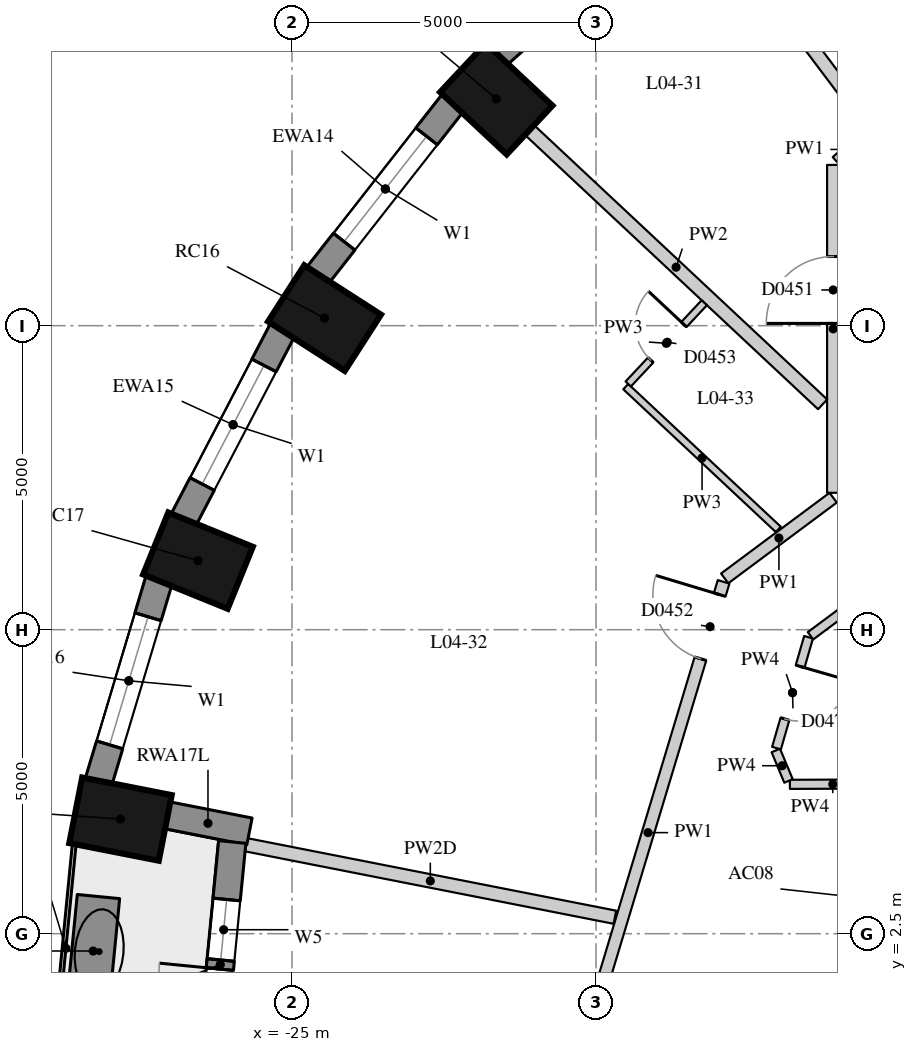
"""IFC4 building model, lengths in metres.
Left out: names, types, materials, properties, quantities, classifications, styles, units other than length and angle.
Written with IfcOpenShell. Run it as: python <this file> out.ifc"""

import sys

from ifc_helpers import new_model, si_unit, direction, frame, frame_2d, origin, origin_2d, place, context, subcontext, project, spatial, rectangle, extrude, element, fill, save


model = new_model("IFC4")
c1 = context("Model", 3, precision=1e-05, world=origin(), true_north=direction((0.0, 1.0)))
c2 = subcontext(c1, "Body", "Model", "MODEL_VIEW")
j1 = project(units=[si_unit("LENGTHUNIT", "METRE"), si_unit("PLANEANGLEUNIT", "RADIAN")], contexts=[c1])
p1 = place(None, origin())
s1 = spatial("IfcSite", under=j1, at=p1, CompositionType="ELEMENT")
p2 = place(p1, origin())
s2 = spatial("IfcBuilding", under=s1, at=p2, CompositionType="ELEMENT")
p3 = place(p2, frame((0.0, 0.0, 21.7)))
s3 = spatial("IfcBuildingStorey", under=s2, at=p3, CompositionType="ELEMENT", Elevation=21.7)
for number, where, z_axis, x_axis in (
    (1, (-21.641, 16.23, 0.0), (0.0, 0.0, 1.0), (-0.73, 0.683, 0.0)),
    (2, (-24.465, 12.625, 0.0), (0.0, 0.0, 1.0), (-0.841, 0.541, 0.0)),
    (3, (-26.546, 8.636, 0.0), (0.0, 0.0, 1.0), (-0.927, 0.376, 0.0)),
    (4, (-27.821, 4.385, 0.0), (0.0, 0.0, 1.0), (-0.981, 0.193, 0.0)),
):
    element("IfcColumn", number, at=place(p3, frame(where, z_axis=z_axis, x_axis=x_axis)), inside=s3, PredefinedType="COLUMN", context=c2, shape_type="SweptSolid", body=[
        extrude(rectangle(XDim=1.5, YDim=1.1, at=origin_2d()), origin(), (0.0, 0.0, 1.0), 3.3),
    ])
p4 = place(p3, frame((-18.871, 19.407, 0.0), z_axis=(0.0, 0.0, 1.0), x_axis=(-0.745526233716, -0.66647628228, 0.0)))
e5 = element("IfcWall", 5, at=p4, inside=s3, PredefinedType="SOLIDWALL", context=c2, shape_type="SweptSolid", body=[
    extrude(rectangle(XDim=3.697, YDim=0.45, at=frame_2d((1.848, 0.0))), origin(), (0.0, 0.0, 1.0), 3.02),
])
p5 = place(p4, frame((0.749, 0.0, 0.4)))
e6 = element("IfcOpeningElement", 6, at=p5, cuts=e5, PredefinedType="OPENING", context=c2, shape_type="SweptSolid", body=[
    extrude(rectangle(XDim=2.2, YDim=1.75, at=frame_2d((1.1, 0.875))), frame((0.0, 0.235, 0.0), z_axis=(0.0, -1.0, 0.0), x_axis=(1.0, 0.0, 0.0)), (0.0, 0.0, 1.0), 0.47),
])
p6 = place(p3, frame((-22.352, 16.17, 0.0), z_axis=(0.0, 0.0, 1.0), x_axis=(-0.616661975264, -0.787228053529, 0.0)))
e7 = element("IfcWall", 7, at=p6, inside=s3, PredefinedType="SOLIDWALL", context=c2, shape_type="SweptSolid", body=[
    extrude(rectangle(XDim=3.61, YDim=0.45, at=frame_2d((1.805, 0.0))), origin(), (0.0, 0.0, 1.0), 3.02),
])
p7 = place(p6, frame((0.705, 0.0, 0.4)))
e8 = element("IfcOpeningElement", 8, at=p7, cuts=e7, PredefinedType="OPENING", context=c2, shape_type="SweptSolid", body=[
    extrude(rectangle(XDim=2.2, YDim=1.75, at=frame_2d((1.1, 0.875))), frame((0.0, 0.235, 0.0), z_axis=(0.0, -1.0, 0.0), x_axis=(1.0, 0.0, 0.0)), (0.0, 0.0, 1.0), 0.47),
])
p8 = place(p3, frame((-25.152, 12.437, 0.0), z_axis=(0.0, 0.0, 1.0), x_axis=(-0.462492775226, -0.886623050041, 0.0)))
e9 = element("IfcWall", 9, at=p8, inside=s3, PredefinedType="SOLIDWALL", context=c2, shape_type="SweptSolid", body=[
    extrude(rectangle(XDim=3.532, YDim=0.45, at=frame_2d((1.766, 0.0))), origin(), (0.0, 0.0, 1.0), 3.02),
])
p9 = place(p8, frame((0.666, 0.0, 0.4)))
e10 = element("IfcOpeningElement", 10, at=p9, cuts=e9, PredefinedType="OPENING", context=c2, shape_type="SweptSolid", body=[
    extrude(rectangle(XDim=2.2, YDim=1.75, at=frame_2d((1.1, 0.875))), frame((0.0, 0.235, 0.0), z_axis=(0.0, -1.0, 0.0), x_axis=(1.0, 0.0, 0.0)), (0.0, 0.0, 1.0), 0.47),
])
p10 = place(p3, frame((-27.185, 8.323, 0.0), z_axis=(0.0, 0.0, 1.0), x_axis=(-0.287064133733, -0.957911364963, 0.0)))
e11 = element("IfcWall", 11, at=p10, inside=s3, PredefinedType="SOLIDWALL", context=c2, shape_type="SweptSolid", body=[
    extrude(rectangle(XDim=3.473, YDim=0.45, at=frame_2d((1.737, 0.0))), origin(), (0.0, 0.0, 1.0), 3.02),
])
p11 = place(p10, frame((0.637, 0.0, 0.4)))
e12 = element("IfcOpeningElement", 12, at=p11, cuts=e11, PredefinedType="OPENING", context=c2, shape_type="SweptSolid", body=[
    extrude(rectangle(XDim=2.2, YDim=1.75, at=frame_2d((1.1, 0.875))), frame((0.0, 0.235, 0.0), z_axis=(0.0, -1.0, 0.0), x_axis=(1.0, 0.0, 0.0)), (0.0, 0.0, 1.0), 0.47),
])
p12 = place(p3, frame((-27.064, 4.45, 0.0), z_axis=(0.0, 0.0, 1.0), x_axis=(0.98123042829, -0.192838913596, 0.0)))
e13 = element("IfcWall", 13, at=p12, inside=s3, PredefinedType="SOLIDWALL", context=c2, shape_type="SweptSolid", body=[
    extrude(rectangle(XDim=1.39, YDim=0.45, at=frame_2d((0.695, 0.0))), origin(), (0.0, 0.0, 1.0), 2.47),
])
p13 = place(p3, frame((-25.983, 4.008, 0.0), z_axis=(0.0, 0.0, 1.0), x_axis=(-0.097133468736, -0.995271364629, 0.0)))
e14 = element("IfcWall", 14, at=p13, inside=s3, PredefinedType="SOLIDWALL", context=c2, shape_type="SweptSolid", body=[
    extrude(rectangle(XDim=4.049, YDim=0.45, at=frame_2d((2.024, 0.0))), origin(), (0.0, 0.0, 1.0), 3.02),
])
p14 = place(p13, frame((0.949, 0.0, 0.4)))
e15 = element("IfcOpeningElement", 15, at=p14, cuts=e14, PredefinedType="OPENING", context=c2, shape_type="SweptSolid", body=[
    extrude(rectangle(XDim=1.0, YDim=1.75, at=frame_2d((0.5, 0.875))), frame((0.0, 0.235, 0.0), z_axis=(0.0, -1.0, 0.0), x_axis=(1.0, 0.0, 0.0)), (0.0, 0.0, 1.0), 0.47),
])
p15 = place(p13, frame((2.1, 0.0, 0.0)))
e16 = element("IfcOpeningElement", 16, at=p15, cuts=e14, PredefinedType="OPENING", context=c2, shape_type="SweptSolid", body=[
    extrude(rectangle(XDim=1.0, YDim=2.15, at=frame_2d((0.5, 1.075))), frame((0.0, 0.235, 0.0), z_axis=(0.0, -1.0, 0.0), x_axis=(1.0, 0.0, 0.0)), (0.0, 0.0, 1.0), 0.47),
])
p16 = place(p3, frame((-28.183, 3.111, 0.0), z_axis=(0.0, 0.0, 1.0), x_axis=(-0.097381768628, -0.995247100543, 0.0)))
e17 = element("IfcWall", 17, at=p16, inside=s3, PredefinedType="USERDEFINED", context=c2, shape_type="SweptSolid", body=[
    extrude(rectangle(XDim=1.8, YDim=0.7, at=frame_2d((0.9, 0.0))), origin(), (0.0, 0.0, 1.0), 0.75),
])
p17 = place(p3, frame((-17.884, 8.344, 0.0), z_axis=(0.0, 0.0, 1.0), x_axis=(0.802260120548, 0.596974621721, 0.0)))
e18 = element("IfcWall", 18, at=p17, inside=s3, PredefinedType="PARTITIONING", context=c2, shape_type="SweptSolid", body=[
    extrude(rectangle(XDim=2.224, YDim=0.2, at=frame_2d((1.112, 0.0))), origin(), (0.0, 0.0, 1.0), 3.02),
])
p18 = place(p3, frame((-16.1, 9.751, 0.0), z_axis=(0.0, 0.0, 1.0), x_axis=(0.0, 1.0, 0.0)))
e19 = element("IfcWall", 19, at=p18, inside=s3, PredefinedType="PARTITIONING", context=c2, shape_type="SweptSolid", body=[
    extrude(rectangle(XDim=5.393, YDim=0.2, at=frame_2d((2.696, 0.0))), origin(), (0.0, 0.0, 1.0), 3.02),
])
p19 = place(p18, frame((2.786, 0.0, 0.0)))
e20 = element("IfcOpeningElement", 20, at=p19, cuts=e19, PredefinedType="OPENING", context=c2, shape_type="SweptSolid", body=[
    extrude(rectangle(XDim=1.1, YDim=2.1, at=frame_2d((0.55, 1.05))), frame((0.0, 0.11, 0.0), z_axis=(0.0, -1.0, 0.0), x_axis=(1.0, 0.0, 0.0)), (0.0, 0.0, 1.0), 0.22),
])
p20 = place(p3, frame((-16.041, 15.198, 0.0), z_axis=(0.0, 0.0, 1.0), x_axis=(0.744722115519, 0.667374685359, 0.0)))
e21 = element("IfcWall", 21, at=p20, inside=s3, PredefinedType="PARTITIONING", context=c2, shape_type="SweptSolid", body=[
    extrude(rectangle(XDim=0.603, YDim=0.2, at=frame_2d((0.301, 0.0))), origin(), (0.0, 0.0, 1.0), 3.02),
])
p21 = place(p3, frame((-20.388, 0.038, 0.0), z_axis=(0.0, 0.0, 1.0), x_axis=(0.288600779805, 0.957449523419, 0.0)))
e22 = element("IfcWall", 22, at=p21, inside=s3, PredefinedType="PARTITIONING", context=c2, shape_type="SweptSolid", body=[
    extrude(rectangle(XDim=8.615, YDim=0.2, at=frame_2d((4.308, 0.0))), origin(), (0.0, 0.0, 1.0), 3.02),
])
p22 = place(p21, frame((7.295, 0.0, 0.0)))
e23 = element("IfcOpeningElement", 23, at=p22, cuts=e22, PredefinedType="OPENING", context=c2, shape_type="SweptSolid", body=[
    extrude(rectangle(XDim=1.1, YDim=2.1, at=frame_2d((0.55, 1.05))), frame((0.0, 0.11, 0.0), z_axis=(0.0, -1.0, 0.0), x_axis=(1.0, 0.0, 0.0)), (0.0, 0.0, 1.0), 0.22),
])
p23 = place(p21, frame((0.22, 0.0, 0.0)))
e24 = element("IfcOpeningElement", 24, at=p23, cuts=e22, PredefinedType="OPENING", context=c2, shape_type="SweptSolid", body=[
    extrude(rectangle(XDim=1.1, YDim=2.1, at=frame_2d((0.55, 1.05))), frame((0.0, 0.11, 0.0), z_axis=(0.0, -1.0, 0.0), x_axis=(1.0, 0.0, 0.0)), (0.0, 0.0, 1.0), 0.22),
])
p24 = place(p3, frame((-15.402, 4.961, 0.0), z_axis=(0.0, 0.0, 1.0), x_axis=(-0.999994001087, -0.003463782477, 0.0)))
e25 = element("IfcWall", 25, at=p24, inside=s3, PredefinedType="PARTITIONING", context=c2, shape_type="SweptSolid", body=[
    extrude(rectangle(XDim=1.41, YDim=0.15, at=frame_2d((0.705, 0.0))), origin(), (0.0, 0.0, 1.0), 3.02),
])
p25 = place(p3, frame((-16.834, 5.012, 0.0), z_axis=(0.0, 0.0, 1.0), x_axis=(-0.384455737739, 0.923143426408, 0.0)))
e26 = element("IfcWall", 26, at=p25, inside=s3, PredefinedType="PARTITIONING", context=c2, shape_type="SweptSolid", body=[
    extrude(rectangle(XDim=0.543, YDim=0.15, at=frame_2d((0.271, 0.0))), origin(), (0.0, 0.0, 1.0), 3.02),
])
p26 = place(p3, frame((-17.032, 5.552, 0.0), z_axis=(0.0, 0.0, 1.0), x_axis=(0.277658349549, 0.96067988473, 0.0)))
e27 = element("IfcWall", 27, at=p26, inside=s3, PredefinedType="PARTITIONING", context=c2, shape_type="SweptSolid", body=[
    extrude(rectangle(XDim=1.898, YDim=0.15, at=frame_2d((0.949, 0.0))), origin(), (0.0, 0.0, 1.0), 3.02),
])
p27 = place(p26, frame((0.499, 0.0, 0.0)))
e28 = element("IfcOpeningElement", 28, at=p27, cuts=e27, PredefinedType="OPENING", context=c2, shape_type="SweptSolid", body=[
    extrude(rectangle(XDim=0.9, YDim=2.1, at=frame_2d((0.45, 1.05))), frame((0.0, 0.085, 0.0), z_axis=(0.0, -1.0, 0.0), x_axis=(1.0, 0.0, 0.0)), (0.0, 0.0, 1.0), 0.17),
])
p28 = place(p3, frame((-16.473, 7.4, 0.0), z_axis=(0.0, 0.0, 1.0), x_axis=(0.802267063429, 0.596965291233, 0.0)))
e29 = element("IfcWall", 29, at=p28, inside=s3, PredefinedType="PARTITIONING", context=c2, shape_type="SweptSolid", body=[
    extrude(rectangle(XDim=2.41, YDim=0.15, at=frame_2d((1.205, 0.0))), origin(), (0.0, 0.0, 1.0), 3.02),
])
p29 = place(p3, frame((-17.708, 18.743, 0.0), z_axis=(0.0, 0.0, 1.0), x_axis=(0.601172757903, -0.799119086967, 0.0)))
e30 = element("IfcWall", 30, at=p29, inside=s3, PredefinedType="PARTITIONING", context=c2, shape_type="SweptSolid", body=[
    extrude(rectangle(XDim=3.729, YDim=0.22, at=frame_2d((1.864, 0.0))), origin(), (0.0, 0.0, 1.0), 2.57),
])
p30 = place(p3, frame((-21.093, 15.718, 0.0), z_axis=(0.0, 0.0, 1.0), x_axis=(0.73009284205, -0.683347965525, 0.0)))
e31 = element("IfcWall", 31, at=p30, inside=s3, PredefinedType="PARTITIONING", context=c2, shape_type="SweptSolid", body=[
    extrude(rectangle(XDim=6.602, YDim=0.22, at=frame_2d((3.301, 0.0))), origin(), (0.0, 0.0, 1.0), 3.02),
])
p31 = place(p3, frame((-25.761, 3.964, 0.0), z_axis=(0.0, 0.0, 1.0), x_axis=(0.981209888948, -0.192943395406, 0.0)))
e32 = element("IfcWall", 32, at=p31, inside=s3, PredefinedType="PARTITIONING", context=c2, shape_type="SweptSolid", body=[
    extrude(rectangle(XDim=6.188, YDim=0.22, at=frame_2d((3.094, 0.0))), origin(), (0.0, 0.0, 1.0), 2.47),
])
p32 = place(p3, frame((-17.002, 9.149, 0.0), z_axis=(0.0, 0.0, 1.0), x_axis=(-0.730093035944, 0.683347758368, 0.0)))
e33 = element("IfcWall", 33, at=p32, inside=s3, PredefinedType="PARTITIONING", context=c2, shape_type="SweptSolid", body=[
    extrude(rectangle(XDim=3.437, YDim=0.12, at=frame_2d((1.718, 0.0))), origin(), (0.0, 0.0, 1.0), 3.02),
])
p33 = place(p3, frame((-19.47, 11.542, 0.0), z_axis=(0.0, 0.0, 1.0), x_axis=(0.683306289544, 0.730131847456, 0.0)))
e34 = element("IfcWall", 34, at=p33, inside=s3, PredefinedType="PARTITIONING", context=c2, shape_type="SweptSolid", body=[
    extrude(rectangle(XDim=1.83, YDim=0.12, at=frame_2d((0.915, 0.0))), origin(), (0.0, 0.0, 1.0), 3.02),
])
p34 = place(p33, frame((0.54, 0.0, 0.0)))
e35 = element("IfcOpeningElement", 35, at=p34, cuts=e34, PredefinedType="OPENING", context=c2, shape_type="SweptSolid", body=[
    extrude(rectangle(XDim=0.8, YDim=2.1, at=frame_2d((0.4, 1.05))), frame((0.0, 0.07, 0.0), z_axis=(0.0, -1.0, 0.0), x_axis=(1.0, 0.0, 0.0)), (0.0, 0.0, 1.0), 0.14),
])
p35 = place(p7, origin())
e36 = element("IfcWindow", 36, at=p35, inside=s3, PartitioningType="SINGLE_PANEL", PredefinedType="WINDOW", context=c2, shape_type="SweptSolid", body=[
    extrude(rectangle(XDim=2.2, YDim=1.75, at=frame_2d((1.1, 0.875))), frame((0.0, 0.035, 0.0), z_axis=(0.0, -1.0, 0.0), x_axis=(1.0, 0.0, 0.0)), (0.0, 0.0, 1.0), 0.06),
])
fill(e8, e36)
p36 = place(p9, origin())
e37 = element("IfcWindow", 37, at=p36, inside=s3, PartitioningType="SINGLE_PANEL", PredefinedType="WINDOW", context=c2, shape_type="SweptSolid", body=[
    extrude(rectangle(XDim=2.2, YDim=1.75, at=frame_2d((1.1, 0.875))), frame((0.0, 0.035, 0.0), z_axis=(0.0, -1.0, 0.0), x_axis=(1.0, 0.0, 0.0)), (0.0, 0.0, 1.0), 0.06),
])
fill(e10, e37)
p37 = place(p11, origin())
e38 = element("IfcWindow", 38, at=p37, inside=s3, PartitioningType="SINGLE_PANEL", PredefinedType="WINDOW", context=c2, shape_type="SweptSolid", body=[
    extrude(rectangle(XDim=2.2, YDim=1.75, at=frame_2d((1.1, 0.875))), frame((0.0, 0.035, 0.0), z_axis=(0.0, -1.0, 0.0), x_axis=(1.0, 0.0, 0.0)), (0.0, 0.0, 1.0), 0.06),
])
fill(e12, e38)
p38 = place(p14, origin())
e39 = element("IfcWindow", 39, at=p38, inside=s3, PartitioningType="SINGLE_PANEL", PredefinedType="WINDOW", context=c2, shape_type="SweptSolid", body=[
    extrude(rectangle(XDim=1.0, YDim=1.75, at=frame_2d((0.5, 0.875))), frame((0.0, 0.035, 0.0), z_axis=(0.0, -1.0, 0.0), x_axis=(1.0, 0.0, 0.0)), (0.0, 0.0, 1.0), 0.06),
])
fill(e15, e39)
p39 = place(p15, frame((1.0, 0.0, 0.0), z_axis=(0.0, 0.0, 1.0), x_axis=(-1.0, 0.0, 0.0)))
e40 = element("IfcDoor", 40, at=p39, inside=s3, OperationType="SINGLE_SWING_RIGHT", PredefinedType="DOOR", context=c2, shape_type="SweptSolid", body=[
    extrude(rectangle(XDim=1.0, YDim=2.15, at=frame_2d((0.5, 1.075))), frame((0.0, 0.075, 0.0), z_axis=(0.0, -1.0, 0.0), x_axis=(1.0, 0.0, 0.0)), (0.0, 0.0, 1.0), 0.05),
])
fill(e16, e40)
p40 = place(p19, origin())
e41 = element("IfcDoor", 41, at=p40, inside=s3, OperationType="SINGLE_SWING_LEFT", PredefinedType="DOOR", context=c2, shape_type="SweptSolid", body=[
    extrude(rectangle(XDim=1.1, YDim=2.1, at=frame_2d((0.55, 1.05))), frame((0.0, 0.025, 0.0), z_axis=(0.0, -1.0, 0.0), x_axis=(1.0, 0.0, 0.0)), (0.0, 0.0, 1.0), 0.05),
])
fill(e20, e41)
p41 = place(p22, origin())
e42 = element("IfcDoor", 42, at=p41, inside=s3, OperationType="SINGLE_SWING_RIGHT", PredefinedType="DOOR", context=c2, shape_type="SweptSolid", body=[
    extrude(rectangle(XDim=1.1, YDim=2.1, at=frame_2d((0.55, 1.05))), frame((0.0, 0.025, 0.0), z_axis=(0.0, -1.0, 0.0), x_axis=(1.0, 0.0, 0.0)), (0.0, 0.0, 1.0), 0.05),
])
fill(e23, e42)
p42 = place(p34, origin())
e43 = element("IfcDoor", 43, at=p42, inside=s3, OperationType="SINGLE_SWING_RIGHT", PredefinedType="DOOR", context=c2, shape_type="SweptSolid", body=[
    extrude(rectangle(XDim=0.8, YDim=2.1, at=frame_2d((0.4, 1.05))), frame((0.0, 0.025, 0.0), z_axis=(0.0, -1.0, 0.0), x_axis=(1.0, 0.0, 0.0)), (0.0, 0.0, 1.0), 0.05),
])
fill(e35, e43)
p43 = place(p27, origin())
e44 = element("IfcDoor", 44, at=p43, inside=s3, OperationType="SINGLE_SWING_LEFT", PredefinedType="DOOR", context=c2, shape_type="SweptSolid", body=[
    extrude(rectangle(XDim=0.9, YDim=2.1, at=frame_2d((0.45, 1.05))), frame((0.0, 0.025, 0.0), z_axis=(0.0, -1.0, 0.0), x_axis=(1.0, 0.0, 0.0)), (0.0, 0.0, 1.0), 0.05),
])
fill(e28, e44)
save(model, sys.argv[1])
